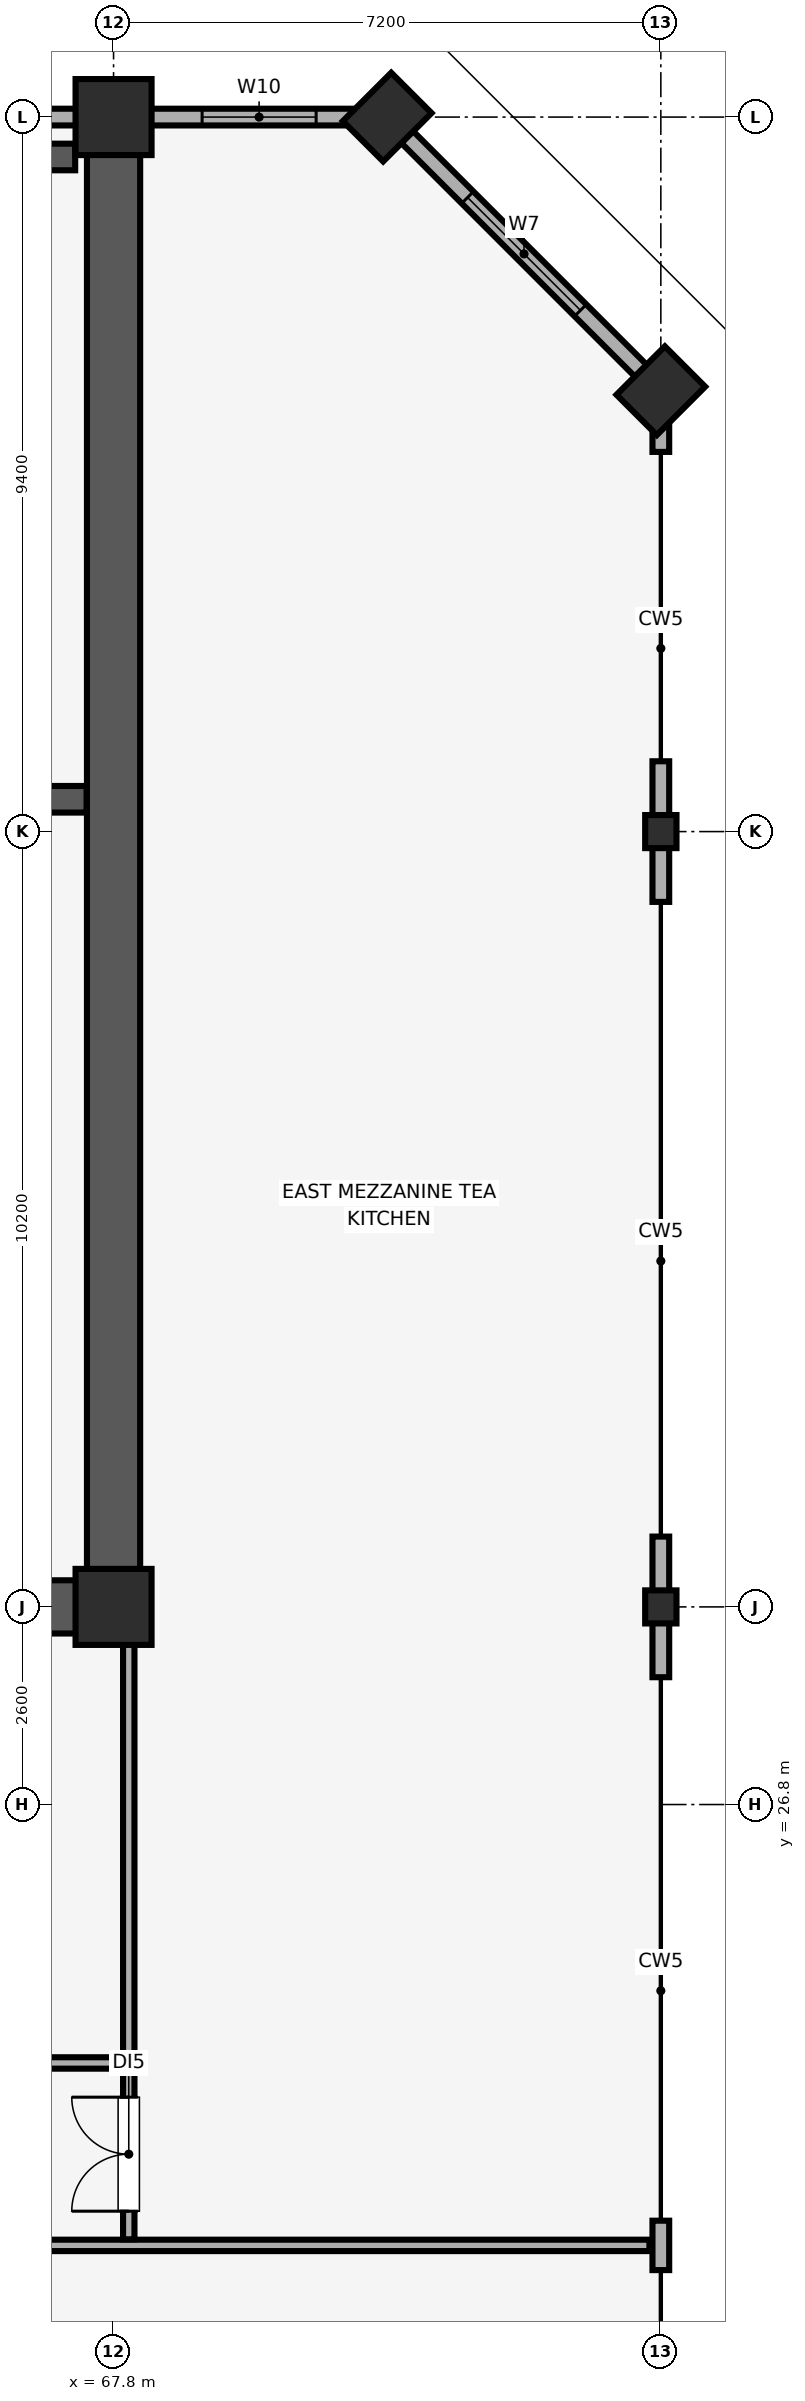
"""IFC4 building model, lengths in metres.
Left out: names, types, materials, properties, quantities, classifications, styles, units other than length and angle.
Written with IfcOpenShell. Run it as: python <this file> out.ifc"""

import sys

from ifc_helpers import new_model, si_unit, direction, frame, frame_2d, origin, origin_2d, place, context, subcontext, project, spatial, rectangle, i_section, extrude, element, fill, save


model = new_model("IFC4")
c1 = context("Model", 3, precision=1e-05, world=origin(), true_north=direction((0.0, 1.0)))
c2 = subcontext(c1, "Body", "Model", "MODEL_VIEW")
j1 = project(units=[si_unit("LENGTHUNIT", "METRE"), si_unit("PLANEANGLEUNIT", "RADIAN")], contexts=[c1])
p1 = place(None, origin())
s1 = spatial("IfcSite", under=j1, at=p1, CompositionType="ELEMENT")
p2 = place(p1, origin())
s2 = spatial("IfcBuilding", under=s1, at=p2, CompositionType="ELEMENT")
p3 = place(p2, frame((0.0, 0.0, 300.2)))
s3 = spatial("IfcBuildingStorey", under=s2, at=p3, CompositionType="ELEMENT", Elevation=300.2)
for number, where, z_axis, x_axis in (
    (1, (75.0, 29.4, 0.0), (0.0, 0.0, 1.0), (1.0, 0.0, 0.0)),
    (2, (75.0, 39.6, 0.0), (0.0, 0.0, 1.0), (1.0, 0.0, 0.0)),
):
    element("IfcColumn", number, at=place(p3, frame(where, z_axis=z_axis, x_axis=x_axis)), inside=s3, PredefinedType="COLUMN", context=c2, shape_type="SweptSolid", body=[
        extrude(i_section(OverallWidth=0.412, OverallDepth=0.435, WebThickness=0.036, FlangeThickness=0.056, FilletRadius=0.015, at=origin_2d()), origin(), (0.0, 0.0, 1.0), 5.12),
    ])
for number, where, z_axis, x_axis in (
    (3, (75.0, 45.4, 0.0), (0.0, 0.0, 1.0), (0.707, 0.707, 0.0)),
    (4, (71.4, 49.0, 0.0), (0.0, 0.0, 1.0), (0.707, 0.707, 0.0)),
):
    element("IfcColumn", number, at=place(p3, frame(where, z_axis=z_axis, x_axis=x_axis)), inside=s3, PredefinedType="PILASTER", context=c2, shape_type="SweptSolid", body=[
        extrude(rectangle(XDim=0.9, YDim=0.75, at=origin_2d()), origin(), (0.0, 0.0, 1.0), 5.12),
    ])
for number, where, z_axis, x_axis in (
    (5, (67.8, 29.4, 0.0), (0.0, 0.0, 1.0), (1.0, 0.0, 0.0)),
    (6, (67.8, 49.0, 0.0), (0.0, 0.0, 1.0), (1.0, 0.0, 0.0)),
):
    element("IfcColumn", number, at=place(p3, frame(where, z_axis=z_axis, x_axis=x_axis)), inside=s3, PredefinedType="COLUMN", context=c2, shape_type="SweptSolid", body=[
        extrude(rectangle(XDim=1.0, YDim=1.0, at=origin_2d()), origin(), (0.0, 0.0, 1.0), 5.12),
    ])
p4 = place(p3, frame((75.0, 20.675, 0.0), z_axis=(0.0, 0.0, 1.0), x_axis=(0.0, 1.0, 0.0)))
e7 = element("IfcWall", 7, at=p4, inside=s3, PredefinedType="SOLIDWALL", context=c2, shape_type="SweptSolid", body=[
    extrude(rectangle(XDim=0.65, YDim=0.22, at=frame_2d((0.325, 0.0))), origin(), (0.0, 0.0, 1.0), 4.32),
])
for number, where, z_axis, x_axis in (
    (8, (75.0, 28.475, 0.0), (0.0, 0.0, 1.0), (0.0, 1.0, 0.0)),
    (9, (75.0, 38.675, 0.0), (0.0, 0.0, 1.0), (0.0, 1.0, 0.0)),
):
    element("IfcWall", number, at=place(p3, frame(where, z_axis=z_axis, x_axis=x_axis)), inside=s3, PredefinedType="SOLIDWALL", context=c2, shape_type="SweptSolid", body=[
        extrude(rectangle(XDim=1.85, YDim=0.22, at=frame_2d((0.925, 0.0))), origin(), (0.0, 0.0, 1.0), 4.32),
    ])
p5 = place(p3, frame((75.0, 44.595, 0.0), z_axis=(0.0, 0.0, 1.0), x_axis=(0.0, 1.0, 0.0)))
e10 = element("IfcWall", 10, at=p5, inside=s3, PredefinedType="SOLIDWALL", context=c2, shape_type="SweptSolid", body=[
    extrude(rectangle(XDim=0.805, YDim=0.22, at=frame_2d((0.402, 0.0))), origin(), (0.0, 0.0, 1.0), 5.12),
])
p6 = place(p3, frame((75.0, 45.4, 0.0), z_axis=(0.0, 0.0, 1.0), x_axis=(-0.707106781187, 0.707106781187, 0.0)))
e11 = element("IfcWall", 11, at=p6, inside=s3, PredefinedType="SOLIDWALL", context=c2, shape_type="SweptSolid", body=[
    extrude(rectangle(XDim=5.091, YDim=0.22, at=frame_2d((2.546, 0.0))), origin(), (0.0, 0.0, 1.0), 4.32),
])
p7 = place(p6, frame((1.496, 0.0, 0.85)))
e12 = element("IfcOpeningElement", 12, at=p7, cuts=e11, PredefinedType="OPENING", context=c2, shape_type="SweptSolid", body=[
    extrude(rectangle(XDim=2.1, YDim=1.6, at=frame_2d((1.05, 0.8))), frame((0.0, 0.12, 0.0), z_axis=(0.0, -1.0, 0.0), x_axis=(1.0, 0.0, 0.0)), (0.0, 0.0, 1.0), 0.24),
])
p8 = place(p3, frame((71.4, 49.0, 0.0), z_axis=(0.0, 0.0, 1.0), x_axis=(-1.0, 0.0, 0.0)))
e13 = element("IfcWall", 13, at=p8, inside=s3, PredefinedType="SOLIDWALL", context=c2, shape_type="SweptSolid", body=[
    extrude(rectangle(XDim=58.8, YDim=0.22, at=frame_2d((29.4, 0.0))), origin(), (0.0, 0.0, 1.0), 4.32),
])
p9 = place(p8, frame((56.365, 0.0, 0.85)))
e14 = element("IfcOpeningElement", 14, at=p9, cuts=e13, PredefinedType="OPENING", context=c2, shape_type="SweptSolid", body=[
    extrude(rectangle(XDim=1.5, YDim=1.4, at=frame_2d((0.75, 0.7))), frame((0.0, 0.12, 0.0), z_axis=(0.0, -1.0, 0.0), x_axis=(1.0, 0.0, 0.0)), (0.0, 0.0, 1.0), 0.24),
])
p10 = place(p8, frame((0.935, 0.0, 0.85)))
e15 = element("IfcOpeningElement", 15, at=p10, cuts=e13, PredefinedType="OPENING", context=c2, shape_type="SweptSolid", body=[
    extrude(rectangle(XDim=1.5, YDim=1.4, at=frame_2d((0.75, 0.7))), frame((0.0, 0.12, 0.0), z_axis=(0.0, -1.0, 0.0), x_axis=(1.0, 0.0, 0.0)), (0.0, 0.0, 1.0), 0.24),
])
p11 = place(p8, frame((41.915, 0.0, 0.9)))
e16 = element("IfcOpeningElement", 16, at=p11, cuts=e13, PredefinedType="OPENING", context=c2, shape_type="SweptSolid", body=[
    extrude(rectangle(XDim=3.6, YDim=1.5, at=frame_2d((1.8, 0.75))), frame((0.0, 0.12, 0.0), z_axis=(0.0, -1.0, 0.0), x_axis=(1.0, 0.0, 0.0)), (0.0, 0.0, 1.0), 0.24),
])
p12 = place(p8, frame((36.85, 0.0, 0.9)))
e17 = element("IfcOpeningElement", 17, at=p12, cuts=e13, PredefinedType="OPENING", context=c2, shape_type="SweptSolid", body=[
    extrude(rectangle(XDim=3.0, YDim=1.5, at=frame_2d((1.5, 0.75))), frame((0.0, 0.12, 0.0), z_axis=(0.0, -1.0, 0.0), x_axis=(1.0, 0.0, 0.0)), (0.0, 0.0, 1.0), 0.24),
])
p13 = place(p8, frame((19.7, 0.0, 0.9)))
e18 = element("IfcOpeningElement", 18, at=p13, cuts=e13, PredefinedType="OPENING", context=c2, shape_type="SweptSolid", body=[
    extrude(rectangle(XDim=3.6, YDim=1.5, at=frame_2d((1.8, 0.75))), frame((0.0, 0.12, 0.0), z_axis=(0.0, -1.0, 0.0), x_axis=(1.0, 0.0, 0.0)), (0.0, 0.0, 1.0), 0.24),
])
p14 = place(p8, frame((14.635, 0.0, 0.9)))
e19 = element("IfcOpeningElement", 19, at=p14, cuts=e13, PredefinedType="OPENING", context=c2, shape_type="SweptSolid", body=[
    extrude(rectangle(XDim=2.4, YDim=1.5, at=frame_2d((1.2, 0.75))), frame((0.0, 0.12, 0.0), z_axis=(0.0, -1.0, 0.0), x_axis=(1.0, 0.0, 0.0)), (0.0, 0.0, 1.0), 0.24),
])
p15 = place(p3, frame((67.8, 29.4, 0.0), z_axis=(0.0, 0.0, 1.0), x_axis=(0.0, 1.0, 0.0)))
e20 = element("IfcWall", 20, at=p15, inside=s3, PredefinedType="SHEAR", context=c2, shape_type="SweptSolid", body=[
    extrude(rectangle(XDim=19.2, YDim=0.7, at=frame_2d((9.6, 0.0))), origin(), (0.0, 0.0, 1.0), 5.12),
])
p16 = place(p3, frame((60.4, 29.4, 0.0), z_axis=(0.0, 0.0, 1.0), x_axis=(1.0, 0.0, 0.0)))
e21 = element("IfcWall", 21, at=p16, inside=s3, PredefinedType="SHEAR", context=c2, shape_type="SweptSolid", body=[
    extrude(rectangle(XDim=7.045, YDim=0.7, at=frame_2d((3.522, 0.0))), origin(), (0.0, 0.0, 1.0), 5.12),
])
p17 = place(p3, frame((63.145, 40.025, 0.0), z_axis=(0.0, 0.0, 1.0), x_axis=(1.0, 0.0, 0.0)))
e22 = element("IfcWall", 22, at=p17, inside=s3, PredefinedType="SHEAR", context=c2, shape_type="SweptSolid", body=[
    extrude(rectangle(XDim=4.3, YDim=0.35, at=frame_2d((2.15, 0.0))), origin(), (0.0, 0.0, 1.0), 5.12),
])
p18 = place(p17, frame((1.24, 0.0, 0.0)))
e23 = element("IfcOpeningElement", 23, at=p18, cuts=e22, PredefinedType="OPENING", context=c2, shape_type="SweptSolid", body=[
    extrude(rectangle(XDim=1.15, YDim=2.15, at=frame_2d((0.575, 1.075))), frame((0.0, 0.185, 0.0), z_axis=(0.0, -1.0, 0.0), x_axis=(1.0, 0.0, 0.0)), (0.0, 0.0, 1.0), 0.37),
])
p19 = place(p3, frame((63.145, 48.475, 0.0), z_axis=(0.0, 0.0, 1.0), x_axis=(1.0, 0.0, 0.0)))
e24 = element("IfcWall", 24, at=p19, inside=s3, PredefinedType="SHEAR", context=c2, shape_type="SweptSolid", body=[
    extrude(rectangle(XDim=4.15, YDim=0.35, at=frame_2d((2.075, 0.0))), origin(), (0.0, 0.0, 1.0), 5.12),
])
p20 = place(p3, frame((45.8, 21.0, 0.0), z_axis=(0.0, 0.0, 1.0), x_axis=(1.0, 0.0, 0.0)))
e25 = element("IfcWall", 25, at=p20, inside=s3, PredefinedType="PARTITIONING", context=c2, shape_type="SweptSolid", body=[
    extrude(rectangle(XDim=29.05, YDim=0.15, at=frame_2d((14.525, 0.0))), origin(), (0.0, 0.0, 1.0), 5.12),
])
p21 = place(p20, frame((10.45, 0.0, 0.0)))
e26 = element("IfcOpeningElement", 26, at=p21, cuts=e25, PredefinedType="OPENING", context=c2, shape_type="SweptSolid", body=[
    extrude(rectangle(XDim=1.5, YDim=2.25, at=frame_2d((0.75, 1.125))), frame((0.0, 0.085, 0.0), z_axis=(0.0, -1.0, 0.0), x_axis=(1.0, 0.0, 0.0)), (0.0, 0.0, 1.0), 0.17),
])
p22 = place(p3, frame((44.2, 23.4, 0.0), z_axis=(0.0, 0.0, 1.0), x_axis=(1.0, 0.0, 0.0)))
e27 = element("IfcWall", 27, at=p22, inside=s3, PredefinedType="PARTITIONING", context=c2, shape_type="SweptSolid", body=[
    extrude(rectangle(XDim=23.8, YDim=0.15, at=frame_2d((11.9, 0.0))), origin(), (0.0, 0.0, 1.0), 5.12),
])
p23 = place(p22, frame((12.3, 0.0, 0.0)))
e28 = element("IfcOpeningElement", 28, at=p23, cuts=e27, PredefinedType="OPENING", context=c2, shape_type="SweptSolid", body=[
    extrude(rectangle(XDim=1.0, YDim=2.15, at=frame_2d((0.5, 1.075))), frame((0.0, 0.085, 0.0), z_axis=(0.0, -1.0, 0.0), x_axis=(1.0, 0.0, 0.0)), (0.0, 0.0, 1.0), 0.17),
])
p24 = place(p3, frame((68.0, 23.48, 0.0), z_axis=(0.0, 0.0, 1.0), x_axis=(0.0, 1.0, 0.0)))
e29 = element("IfcWall", 29, at=p24, inside=s3, PredefinedType="PARTITIONING", context=c2, shape_type="SweptSolid", body=[
    extrude(rectangle(XDim=5.91, YDim=0.15, at=frame_2d((2.955, 0.0))), origin(), (0.0, 0.0, 1.0), 4.76),
])
p25 = place(p3, frame((68.0, 21.08, 0.0), z_axis=(0.0, 0.0, 1.0), x_axis=(0.0, 1.0, 0.0)))
e30 = element("IfcWall", 30, at=p25, inside=s3, PredefinedType="PARTITIONING", context=c2, shape_type="SweptSolid", body=[
    extrude(rectangle(XDim=2.24, YDim=0.15, at=frame_2d((1.12, 0.0))), origin(), (0.0, 0.0, 1.0), 4.76),
])
p26 = place(p25, frame((0.37, 0.0, 0.0)))
e31 = element("IfcOpeningElement", 31, at=p26, cuts=e30, PredefinedType="OPENING", context=c2, shape_type="SweptSolid", body=[
    extrude(rectangle(XDim=1.5, YDim=2.25, at=frame_2d((0.75, 1.125))), frame((0.0, 0.085, 0.0), z_axis=(0.0, -1.0, 0.0), x_axis=(1.0, 0.0, 0.0)), (0.0, 0.0, 1.0), 0.17),
])
p27 = place(p7, origin())
e32 = element("IfcWindow", 32, at=p27, inside=s3, PartitioningType="SINGLE_PANEL", PredefinedType="WINDOW", context=c2, shape_type="SweptSolid", body=[
    extrude(rectangle(XDim=2.1, YDim=1.6, at=frame_2d((1.05, 0.8))), frame((0.0, 0.03, 0.0), z_axis=(0.0, -1.0, 0.0), x_axis=(1.0, 0.0, 0.0)), (0.0, 0.0, 1.0), 0.06),
])
fill(e12, e32)
p28 = place(p10, origin())
e33 = element("IfcWindow", 33, at=p28, inside=s3, PartitioningType="SINGLE_PANEL", PredefinedType="WINDOW", context=c2, shape_type="SweptSolid", body=[
    extrude(rectangle(XDim=1.5, YDim=1.4, at=frame_2d((0.75, 0.7))), frame((0.0, 0.03, 0.0), z_axis=(0.0, -1.0, 0.0), x_axis=(1.0, 0.0, 0.0)), (0.0, 0.0, 1.0), 0.06),
])
fill(e15, e33)
p29 = place(p26, origin())
e34 = element("IfcDoor", 34, at=p29, inside=s3, OperationType="DOUBLE_DOOR_SINGLE_SWING", PredefinedType="DOOR", context=c2, shape_type="SweptSolid", body=[
    extrude(rectangle(XDim=1.5, YDim=2.25, at=frame_2d((0.75, 1.125))), frame((0.0, 0.025, 0.0), z_axis=(0.0, -1.0, 0.0), x_axis=(1.0, 0.0, 0.0)), (0.0, 0.0, 1.0), 0.05),
])
fill(e31, e34)
save(model, sys.argv[1])
